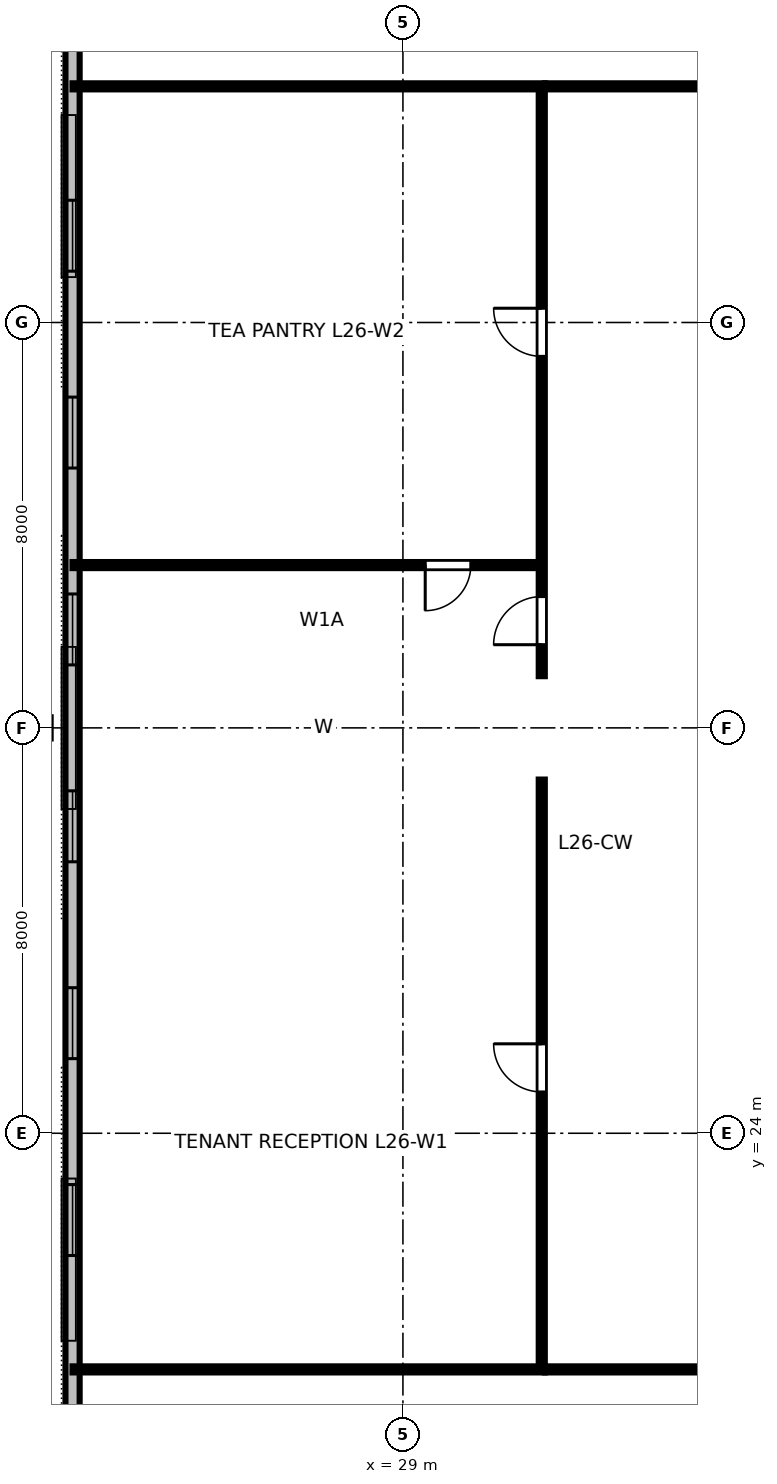
"""IFC4 building model, lengths in metres.
Left out: names, types, materials, properties, quantities, classifications, styles, units other than length and angle.
Written with IfcOpenShell. Run it as: python <this file> out.ifc"""

import sys

from ifc_helpers import new_model, si_unit, direction, frame, frame_2d, origin, origin_2d, place, context, subcontext, project, spatial, rectangle, i_section, extrude, element, fill, save


model = new_model("IFC4")
c1 = context("Model", 3, precision=1e-05, world=origin(), true_north=direction((0.0, 1.0)))
c2 = subcontext(c1, "Body", "Model", "MODEL_VIEW")
j1 = project(units=[si_unit("LENGTHUNIT", "METRE"), si_unit("PLANEANGLEUNIT", "RADIAN")], contexts=[c1])
p1 = place(None, origin())
s1 = spatial("IfcSite", under=j1, at=p1, CompositionType="ELEMENT")
p2 = place(p1, origin())
s2 = spatial("IfcBuilding", under=s1, at=p2, CompositionType="ELEMENT")
p3 = place(p2, frame((0.0, 0.0, 102.4)))
s3 = spatial("IfcBuildingStorey", under=s2, at=p3, CompositionType="ELEMENT", Elevation=102.4)
p4 = place(p3, frame((21.82, 32.0, 0.0), z_axis=(0.190004151907, 0.0, 0.981783286809), x_axis=(-0.981783286809, 0.0, 0.190004151907)))
e1 = element("IfcColumn", 1, at=p4, inside=s3, PredefinedType="COLUMN", context=c2, shape_type="SweptSolid", body=[
    extrude(i_section(OverallWidth=0.418, OverallDepth=0.455, WebThickness=0.042, FlangeThickness=0.068, FilletRadius=0.025, at=origin_2d()), origin(), (0.0, 0.0, 1.0), 3.42),
])
p5 = place(p3, frame((22.48, 48.64, 0.0), z_axis=(0.0, 0.0, 1.0), x_axis=(0.0, -1.0, 0.0)))
e2 = element("IfcWall", 2, at=p5, inside=s3, PredefinedType="STANDARD", context=c2, shape_type="SweptSolid", body=[
    extrude(rectangle(XDim=33.28, YDim=0.28, at=frame_2d((16.64, 0.0))), origin(), (0.0, 0.0, 1.0), 2.662),
])
p6 = place(p5, frame((6.228, 0.0, 0.85)))
e3 = element("IfcOpeningElement", 3, at=p6, cuts=e2, PredefinedType="OPENING", context=c2, shape_type="SweptSolid", body=[
    extrude(rectangle(XDim=1.4, YDim=1.2, at=frame_2d((0.7, 0.6))), frame((0.0, 0.15, 0.0), z_axis=(0.0, -1.0, 0.0), x_axis=(1.0, 0.0, 0.0)), (0.0, 0.0, 1.0), 0.3),
])
p7 = place(p5, frame((10.113, 0.0, 0.85)))
e4 = element("IfcOpeningElement", 4, at=p7, cuts=e2, PredefinedType="OPENING", context=c2, shape_type="SweptSolid", body=[
    extrude(rectangle(XDim=1.4, YDim=1.2, at=frame_2d((0.7, 0.6))), frame((0.0, 0.15, 0.0), z_axis=(0.0, -1.0, 0.0), x_axis=(1.0, 0.0, 0.0)), (0.0, 0.0, 1.0), 0.3),
])
p8 = place(p5, frame((13.998, 0.0, 0.85)))
e5 = element("IfcOpeningElement", 5, at=p8, cuts=e2, PredefinedType="OPENING", context=c2, shape_type="SweptSolid", body=[
    extrude(rectangle(XDim=1.4, YDim=1.2, at=frame_2d((0.7, 0.6))), frame((0.0, 0.15, 0.0), z_axis=(0.0, -1.0, 0.0), x_axis=(1.0, 0.0, 0.0)), (0.0, 0.0, 1.0), 0.3),
])
p9 = place(p5, frame((17.883, 0.0, 0.85)))
e6 = element("IfcOpeningElement", 6, at=p9, cuts=e2, PredefinedType="OPENING", context=c2, shape_type="SweptSolid", body=[
    extrude(rectangle(XDim=1.4, YDim=1.2, at=frame_2d((0.7, 0.6))), frame((0.0, 0.15, 0.0), z_axis=(0.0, -1.0, 0.0), x_axis=(1.0, 0.0, 0.0)), (0.0, 0.0, 1.0), 0.3),
])
p10 = place(p5, frame((21.768, 0.0, 0.85)))
e7 = element("IfcOpeningElement", 7, at=p10, cuts=e2, PredefinedType="OPENING", context=c2, shape_type="SweptSolid", body=[
    extrude(rectangle(XDim=1.4, YDim=1.2, at=frame_2d((0.7, 0.6))), frame((0.0, 0.15, 0.0), z_axis=(0.0, -1.0, 0.0), x_axis=(1.0, 0.0, 0.0)), (0.0, 0.0, 1.0), 0.3),
])
p11 = place(p5, frame((25.653, 0.0, 0.85)))
e8 = element("IfcOpeningElement", 8, at=p11, cuts=e2, PredefinedType="OPENING", context=c2, shape_type="SweptSolid", body=[
    extrude(rectangle(XDim=1.4, YDim=1.2, at=frame_2d((0.7, 0.6))), frame((0.0, 0.15, 0.0), z_axis=(0.0, -1.0, 0.0), x_axis=(1.0, 0.0, 0.0)), (0.0, 0.0, 1.0), 0.3),
])
p12 = place(p3, frame((31.8, 19.34, 0.0), z_axis=(0.0, 0.0, 1.0), x_axis=(1.0, 0.0, 0.0)))
e9 = element("IfcWall", 9, at=p12, inside=s3, PredefinedType="PARTITIONING", context=c2, shape_type="SweptSolid", body=[
    extrude(rectangle(XDim=28.4, YDim=0.12, at=frame_2d((14.2, 0.0))), origin(), (0.0, 0.0, 1.0), 2.64),
])
p13 = place(p12, frame((4.201, 0.0, 0.0)))
e10 = element("IfcOpeningElement", 10, at=p13, cuts=e9, PredefinedType="OPENING", context=c2, shape_type="SweptSolid", body=[
    extrude(rectangle(XDim=0.95, YDim=2.15, at=frame_2d((0.475, 1.075))), frame((0.0, 0.07, 0.0), z_axis=(0.0, -1.0, 0.0), x_axis=(1.0, 0.0, 0.0)), (0.0, 0.0, 1.0), 0.14),
])
p14 = place(p12, frame((11.29, 0.0, 0.0)))
e11 = element("IfcOpeningElement", 11, at=p14, cuts=e9, PredefinedType="OPENING", context=c2, shape_type="SweptSolid", body=[
    extrude(rectangle(XDim=0.95, YDim=2.15, at=frame_2d((0.475, 1.075))), frame((0.0, 0.07, 0.0), z_axis=(0.0, -1.0, 0.0), x_axis=(1.0, 0.0, 0.0)), (0.0, 0.0, 1.0), 0.14),
])
p15 = place(p12, frame((17.423, 0.0, 0.0)))
e12 = element("IfcOpeningElement", 12, at=p15, cuts=e9, PredefinedType="OPENING", context=c2, shape_type="SweptSolid", body=[
    extrude(rectangle(XDim=0.95, YDim=2.15, at=frame_2d((0.475, 1.075))), frame((0.0, 0.07, 0.0), z_axis=(0.0, -1.0, 0.0), x_axis=(1.0, 0.0, 0.0)), (0.0, 0.0, 1.0), 0.14),
])
p16 = place(p12, frame((24.394, 0.0, 0.0)))
e13 = element("IfcOpeningElement", 13, at=p16, cuts=e9, PredefinedType="OPENING", context=c2, shape_type="SweptSolid", body=[
    extrude(rectangle(XDim=0.95, YDim=2.15, at=frame_2d((0.475, 1.075))), frame((0.0, 0.07, 0.0), z_axis=(0.0, -1.0, 0.0), x_axis=(1.0, 0.0, 0.0)), (0.0, 0.0, 1.0), 0.14),
])
p17 = place(p3, frame((31.8, 44.66, 0.0), z_axis=(0.0, 0.0, 1.0), x_axis=(1.0, 0.0, 0.0)))
e14 = element("IfcWall", 14, at=p17, inside=s3, PredefinedType="PARTITIONING", context=c2, shape_type="SweptSolid", body=[
    extrude(rectangle(XDim=28.4, YDim=0.12, at=frame_2d((14.2, 0.0))), origin(), (0.0, 0.0, 1.0), 2.64),
])
p18 = place(p17, frame((3.452, 0.0, 0.0)))
e15 = element("IfcOpeningElement", 15, at=p18, cuts=e14, PredefinedType="OPENING", context=c2, shape_type="SweptSolid", body=[
    extrude(rectangle(XDim=0.95, YDim=2.15, at=frame_2d((0.475, 1.075))), frame((0.0, 0.07, 0.0), z_axis=(0.0, -1.0, 0.0), x_axis=(1.0, 0.0, 0.0)), (0.0, 0.0, 1.0), 0.14),
])
p19 = place(p17, frame((12.551, 0.0, 0.0)))
e16 = element("IfcOpeningElement", 16, at=p19, cuts=e14, PredefinedType="OPENING", context=c2, shape_type="SweptSolid", body=[
    extrude(rectangle(XDim=0.95, YDim=2.15, at=frame_2d((0.475, 1.075))), frame((0.0, 0.07, 0.0), z_axis=(0.0, -1.0, 0.0), x_axis=(1.0, 0.0, 0.0)), (0.0, 0.0, 1.0), 0.14),
])
p20 = place(p17, frame((22.823, 0.0, 0.0)))
e17 = element("IfcOpeningElement", 17, at=p20, cuts=e14, PredefinedType="OPENING", context=c2, shape_type="SweptSolid", body=[
    extrude(rectangle(XDim=0.95, YDim=2.15, at=frame_2d((0.475, 1.075))), frame((0.0, 0.07, 0.0), z_axis=(0.0, -1.0, 0.0), x_axis=(1.0, 0.0, 0.0)), (0.0, 0.0, 1.0), 0.14),
])
p21 = place(p3, frame((31.74, 35.213, 0.0), z_axis=(0.0, 0.0, 1.0), x_axis=(-1.0, 0.0, 0.0)))
e18 = element("IfcWall", 18, at=p21, inside=s3, PredefinedType="PARTITIONING", context=c2, shape_type="SweptSolid", body=[
    extrude(rectangle(XDim=9.26, YDim=0.12, at=frame_2d((4.63, 0.0))), origin(), (0.0, 0.0, 1.0), 2.64),
])
p22 = place(p21, frame((1.4, 0.0, 0.0)))
e19 = element("IfcOpeningElement", 19, at=p22, cuts=e18, PredefinedType="OPENING", context=c2, shape_type="SweptSolid", body=[
    extrude(rectangle(XDim=0.9, YDim=2.15, at=frame_2d((0.45, 1.075))), frame((0.0, 0.07, 0.0), z_axis=(0.0, -1.0, 0.0), x_axis=(1.0, 0.0, 0.0)), (0.0, 0.0, 1.0), 0.14),
])
p23 = place(p3, frame((31.74, 19.4, 0.0), z_axis=(0.0, 0.0, 1.0), x_axis=(0.0, 1.0, 0.0)))
e20 = element("IfcWall", 20, at=p23, inside=s3, PredefinedType="PARTITIONING", context=c2, shape_type="SweptSolid", body=[
    extrude(rectangle(XDim=11.58, YDim=0.12, at=frame_2d((5.79, 0.0))), origin(), (0.0, 0.0, 1.0), 2.64),
])
p24 = place(p23, frame((5.415, 0.0, 0.0)))
e21 = element("IfcOpeningElement", 21, at=p24, cuts=e20, PredefinedType="OPENING", context=c2, shape_type="SweptSolid", body=[
    extrude(rectangle(XDim=0.95, YDim=2.15, at=frame_2d((0.475, 1.075))), frame((0.0, 0.07, 0.0), z_axis=(0.0, -1.0, 0.0), x_axis=(1.0, 0.0, 0.0)), (0.0, 0.0, 1.0), 0.14),
])
p25 = place(p3, frame((31.74, 33.02, 0.0), z_axis=(0.0, 0.0, 1.0), x_axis=(0.0, 1.0, 0.0)))
e22 = element("IfcWall", 22, at=p25, inside=s3, PredefinedType="PARTITIONING", context=c2, shape_type="SweptSolid", body=[
    extrude(rectangle(XDim=11.58, YDim=0.12, at=frame_2d((5.79, 0.0))), origin(), (0.0, 0.0, 1.0), 2.64),
])
p26 = place(p25, frame((0.621, 0.0, 0.0)))
e23 = element("IfcOpeningElement", 23, at=p26, cuts=e22, PredefinedType="OPENING", context=c2, shape_type="SweptSolid", body=[
    extrude(rectangle(XDim=0.95, YDim=2.15, at=frame_2d((0.475, 1.075))), frame((0.0, 0.07, 0.0), z_axis=(0.0, -1.0, 0.0), x_axis=(1.0, 0.0, 0.0)), (0.0, 0.0, 1.0), 0.14),
])
p27 = place(p25, frame((6.311, 0.0, 0.0)))
e24 = element("IfcOpeningElement", 24, at=p27, cuts=e22, PredefinedType="OPENING", context=c2, shape_type="SweptSolid", body=[
    extrude(rectangle(XDim=0.95, YDim=2.15, at=frame_2d((0.475, 1.075))), frame((0.0, 0.07, 0.0), z_axis=(0.0, -1.0, 0.0), x_axis=(1.0, 0.0, 0.0)), (0.0, 0.0, 1.0), 0.14),
])
for number, where, z_axis, x_axis in (
    (25, (31.8, 19.34, 0.0), (0.0, 0.0, 1.0), (-1.0, 0.0, 0.0)),
    (26, (31.8, 44.66, 0.0), (0.0, 0.0, 1.0), (-1.0, 0.0, 0.0)),
):
    element("IfcWall", number, at=place(p3, frame(where, z_axis=z_axis, x_axis=x_axis)), inside=s3, PredefinedType="PARTITIONING", context=c2, shape_type="SweptSolid", body=[
        extrude(rectangle(XDim=9.32, YDim=0.12, at=frame_2d((4.66, 0.0))), origin(), (0.0, 0.0, 1.0), 2.64),
    ])
p28 = place(p6, origin())
e27 = element("IfcWindow", 27, at=p28, inside=s3, PartitioningType="SINGLE_PANEL", PredefinedType="WINDOW", context=c2, shape_type="SweptSolid", body=[
    extrude(rectangle(XDim=1.4, YDim=1.2, at=frame_2d((0.7, 0.6))), frame((0.0, 0.03, 0.0), z_axis=(0.0, -1.0, 0.0), x_axis=(1.0, 0.0, 0.0)), (0.0, 0.0, 1.0), 0.06),
])
fill(e3, e27)
p29 = place(p7, origin())
e28 = element("IfcWindow", 28, at=p29, inside=s3, PartitioningType="SINGLE_PANEL", PredefinedType="WINDOW", context=c2, shape_type="SweptSolid", body=[
    extrude(rectangle(XDim=1.4, YDim=1.2, at=frame_2d((0.7, 0.6))), frame((0.0, 0.03, 0.0), z_axis=(0.0, -1.0, 0.0), x_axis=(1.0, 0.0, 0.0)), (0.0, 0.0, 1.0), 0.06),
])
fill(e4, e28)
p30 = place(p8, origin())
e29 = element("IfcWindow", 29, at=p30, inside=s3, PartitioningType="SINGLE_PANEL", PredefinedType="WINDOW", context=c2, shape_type="SweptSolid", body=[
    extrude(rectangle(XDim=1.4, YDim=1.2, at=frame_2d((0.7, 0.6))), frame((0.0, 0.03, 0.0), z_axis=(0.0, -1.0, 0.0), x_axis=(1.0, 0.0, 0.0)), (0.0, 0.0, 1.0), 0.06),
])
fill(e5, e29)
p31 = place(p9, origin())
e30 = element("IfcWindow", 30, at=p31, inside=s3, PartitioningType="SINGLE_PANEL", PredefinedType="WINDOW", context=c2, shape_type="SweptSolid", body=[
    extrude(rectangle(XDim=1.4, YDim=1.2, at=frame_2d((0.7, 0.6))), frame((0.0, 0.03, 0.0), z_axis=(0.0, -1.0, 0.0), x_axis=(1.0, 0.0, 0.0)), (0.0, 0.0, 1.0), 0.06),
])
fill(e6, e30)
p32 = place(p10, origin())
e31 = element("IfcWindow", 31, at=p32, inside=s3, PartitioningType="SINGLE_PANEL", PredefinedType="WINDOW", context=c2, shape_type="SweptSolid", body=[
    extrude(rectangle(XDim=1.4, YDim=1.2, at=frame_2d((0.7, 0.6))), frame((0.0, 0.03, 0.0), z_axis=(0.0, -1.0, 0.0), x_axis=(1.0, 0.0, 0.0)), (0.0, 0.0, 1.0), 0.06),
])
fill(e7, e31)
p33 = place(p11, origin())
e32 = element("IfcWindow", 32, at=p33, inside=s3, PartitioningType="SINGLE_PANEL", PredefinedType="WINDOW", context=c2, shape_type="SweptSolid", body=[
    extrude(rectangle(XDim=1.4, YDim=1.2, at=frame_2d((0.7, 0.6))), frame((0.0, 0.03, 0.0), z_axis=(0.0, -1.0, 0.0), x_axis=(1.0, 0.0, 0.0)), (0.0, 0.0, 1.0), 0.06),
])
fill(e8, e32)
p34 = place(p22, origin())
e33 = element("IfcDoor", 33, at=p34, inside=s3, OperationType="SINGLE_SWING_RIGHT", PredefinedType="DOOR", context=c2, shape_type="SweptSolid", body=[
    extrude(rectangle(XDim=0.9, YDim=2.15, at=frame_2d((0.45, 1.075))), frame((0.0, 0.025, 0.0), z_axis=(0.0, -1.0, 0.0), x_axis=(1.0, 0.0, 0.0)), (0.0, 0.0, 1.0), 0.05),
])
fill(e19, e33)
p35 = place(p24, origin())
e34 = element("IfcDoor", 34, at=p35, inside=s3, OperationType="SINGLE_SWING_RIGHT", PredefinedType="DOOR", context=c2, shape_type="SweptSolid", body=[
    extrude(rectangle(XDim=0.95, YDim=2.15, at=frame_2d((0.475, 1.075))), frame((0.0, 0.025, 0.0), z_axis=(0.0, -1.0, 0.0), x_axis=(1.0, 0.0, 0.0)), (0.0, 0.0, 1.0), 0.05),
])
fill(e21, e34)
p36 = place(p26, origin())
e35 = element("IfcDoor", 35, at=p36, inside=s3, OperationType="SINGLE_SWING_LEFT", PredefinedType="DOOR", context=c2, shape_type="SweptSolid", body=[
    extrude(rectangle(XDim=0.95, YDim=2.15, at=frame_2d((0.475, 1.075))), frame((0.0, 0.025, 0.0), z_axis=(0.0, -1.0, 0.0), x_axis=(1.0, 0.0, 0.0)), (0.0, 0.0, 1.0), 0.05),
])
fill(e23, e35)
p37 = place(p27, origin())
e36 = element("IfcDoor", 36, at=p37, inside=s3, OperationType="SINGLE_SWING_RIGHT", PredefinedType="DOOR", context=c2, shape_type="SweptSolid", body=[
    extrude(rectangle(XDim=0.95, YDim=2.15, at=frame_2d((0.475, 1.075))), frame((0.0, 0.025, 0.0), z_axis=(0.0, -1.0, 0.0), x_axis=(1.0, 0.0, 0.0)), (0.0, 0.0, 1.0), 0.05),
])
fill(e24, e36)
save(model, sys.argv[1])
